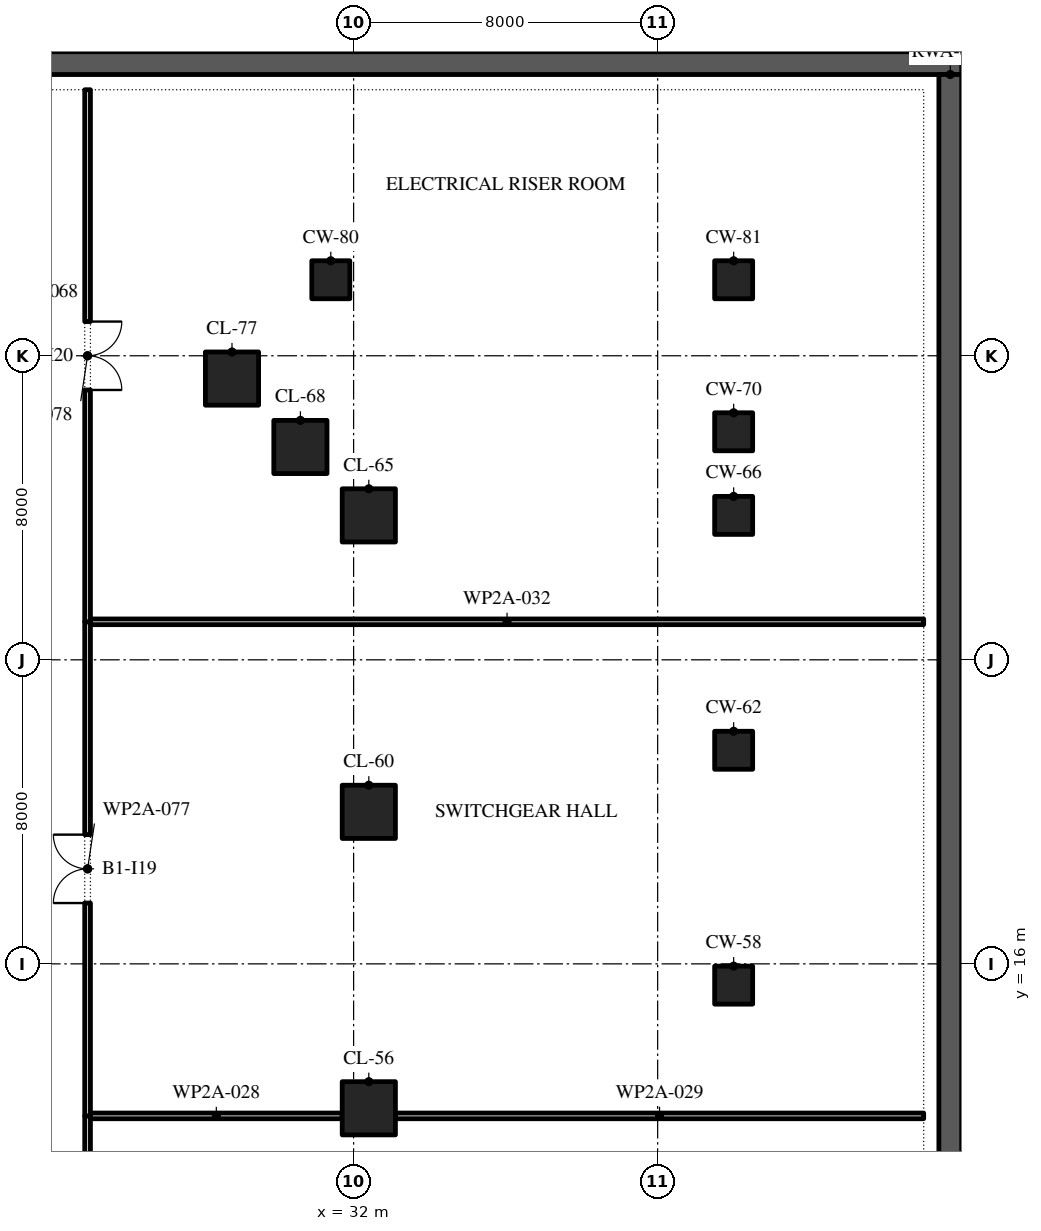
"""IFC4 building model, lengths in metres.
Left out: names, types, materials, properties, quantities, classifications, styles, units other than length and angle.
Written with IfcOpenShell. Run it as: python <this file> out.ifc"""

import sys

from ifc_helpers import new_model, si_unit, direction, frame, frame_2d, origin, origin_2d, place, context, subcontext, project, spatial, rectangle, extrude, element, fill, save


model = new_model("IFC4")
c1 = context("Model", 3, precision=1e-05, world=origin(), true_north=direction((0.0, 1.0)))
c2 = subcontext(c1, "Body", "Model", "MODEL_VIEW")
j1 = project(units=[si_unit("LENGTHUNIT", "METRE"), si_unit("PLANEANGLEUNIT", "RADIAN")], contexts=[c1])
p1 = place(None, origin())
s1 = spatial("IfcSite", under=j1, at=p1, CompositionType="ELEMENT")
p2 = place(p1, origin())
s2 = spatial("IfcBuilding", under=s1, at=p2, CompositionType="ELEMENT")
p3 = place(p2, frame((0.0, 0.0, -5.2)))
s3 = spatial("IfcBuildingStorey", under=s2, at=p3, CompositionType="ELEMENT", Elevation=-5.2)
p4 = place(p3, frame((-48.0, 39.7, 0.0), z_axis=(0.0, 0.0, 1.0), x_axis=(1.0, 0.0, 0.0)))
e1 = element("IfcWall", 1, at=p4, inside=s3, PredefinedType="SOLIDWALL", context=c2, shape_type="SweptSolid", body=[
    extrude(rectangle(XDim=96.0, YDim=0.6, at=frame_2d((48.0, 0.0))), origin(), (0.0, 0.0, 1.0), 4.8),
])
p5 = place(p3, frame((47.7, -55.4, 0.0), z_axis=(0.0, 0.0, 1.0), x_axis=(0.0, 1.0, 0.0)))
e2 = element("IfcWall", 2, at=p5, inside=s3, PredefinedType="SOLIDWALL", context=c2, shape_type="SweptSolid", body=[
    extrude(rectangle(XDim=94.8, YDim=0.6, at=frame_2d((47.4, 0.0))), origin(), (0.0, 0.0, 1.0), 4.8),
])
p6 = place(p3, frame((32.4, 12.2, 0.0), z_axis=(0.0, 0.0, 1.0), x_axis=(1.0, 0.0, 0.0)))
e3 = element("IfcColumn", 3, at=p6, inside=s3, PredefinedType="COLUMN", context=c2, shape_type="SweptSolid", body=[
    extrude(rectangle(XDim=1.4, YDim=1.4, at=origin_2d()), origin(), (0.0, 0.0, 1.0), 5.2),
])
p7 = place(p3, frame((42.0, 15.44, 0.0), z_axis=(0.0, 0.0, 1.0), x_axis=(1.0, 0.0, 0.0)))
e4 = element("IfcColumn", 4, at=p7, inside=s3, PredefinedType="COLUMN", context=c2, shape_type="SweptSolid", body=[
    extrude(rectangle(XDim=1.0, YDim=1.0, at=origin_2d()), origin(), (0.0, 0.0, 1.0), 5.2),
])
p8 = place(p3, frame((32.4, 20.0, 0.0), z_axis=(0.0, 0.0, 1.0), x_axis=(1.0, 0.0, 0.0)))
e5 = element("IfcColumn", 5, at=p8, inside=s3, PredefinedType="COLUMN", context=c2, shape_type="SweptSolid", body=[
    extrude(rectangle(XDim=1.4, YDim=1.4, at=origin_2d()), origin(), (0.0, 0.0, 1.0), 5.2),
])
p9 = place(p3, frame((42.0, 21.62, 0.0), z_axis=(0.0, 0.0, 1.0), x_axis=(1.0, 0.0, 0.0)))
e6 = element("IfcColumn", 6, at=p9, inside=s3, PredefinedType="COLUMN", context=c2, shape_type="SweptSolid", body=[
    extrude(rectangle(XDim=1.0, YDim=1.0, at=origin_2d()), origin(), (0.0, 0.0, 1.0), 5.2),
])
p10 = place(p3, frame((32.4, 27.8, 0.0), z_axis=(0.0, 0.0, 1.0), x_axis=(1.0, 0.0, 0.0)))
e7 = element("IfcColumn", 7, at=p10, inside=s3, PredefinedType="COLUMN", context=c2, shape_type="SweptSolid", body=[
    extrude(rectangle(XDim=1.4, YDim=1.4, at=origin_2d()), origin(), (0.0, 0.0, 1.0), 5.2),
])
p11 = place(p3, frame((42.0, 27.8, 0.0), z_axis=(0.0, 0.0, 1.0), x_axis=(1.0, 0.0, 0.0)))
e8 = element("IfcColumn", 8, at=p11, inside=s3, PredefinedType="COLUMN", context=c2, shape_type="SweptSolid", body=[
    extrude(rectangle(XDim=1.0, YDim=1.0, at=origin_2d()), origin(), (0.0, 0.0, 1.0), 5.2),
])
p12 = place(p3, frame((30.6, 29.6, 0.0), z_axis=(0.0, 0.0, 1.0), x_axis=(1.0, 0.0, 0.0)))
e9 = element("IfcColumn", 9, at=p12, inside=s3, PredefinedType="COLUMN", context=c2, shape_type="SweptSolid", body=[
    extrude(rectangle(XDim=1.4, YDim=1.4, at=origin_2d()), origin(), (0.0, 0.0, 1.0), 5.2),
])
p13 = place(p3, frame((42.0, 30.0, 0.0), z_axis=(0.0, 0.0, 1.0), x_axis=(1.0, 0.0, 0.0)))
e10 = element("IfcColumn", 10, at=p13, inside=s3, PredefinedType="COLUMN", context=c2, shape_type="SweptSolid", body=[
    extrude(rectangle(XDim=1.0, YDim=1.0, at=origin_2d()), origin(), (0.0, 0.0, 1.0), 5.2),
])
p14 = place(p3, frame((28.8, 31.4, 0.0), z_axis=(0.0, 0.0, 1.0), x_axis=(1.0, 0.0, 0.0)))
e11 = element("IfcColumn", 11, at=p14, inside=s3, PredefinedType="COLUMN", context=c2, shape_type="SweptSolid", body=[
    extrude(rectangle(XDim=1.4, YDim=1.4, at=origin_2d()), origin(), (0.0, 0.0, 1.0), 5.2),
])
for number, where, z_axis, x_axis in (
    (12, (31.4, 34.0, 0.0), (0.0, 0.0, 1.0), (1.0, 0.0, 0.0)),
    (13, (42.0, 34.0, 0.0), (0.0, 0.0, 1.0), (1.0, 0.0, 0.0)),
):
    element("IfcColumn", number, at=place(p3, frame(where, z_axis=z_axis, x_axis=x_axis)), inside=s3, PredefinedType="COLUMN", context=c2, shape_type="SweptSolid", body=[
        extrude(rectangle(XDim=1.0, YDim=1.0, at=origin_2d()), origin(), (0.0, 0.0, 1.0), 5.2),
    ])
p15 = place(p3, frame((25.075, 12.0, 0.0), z_axis=(0.0, 0.0, 1.0), x_axis=(1.0, 0.0, 0.0)))
e14 = element("IfcWall", 14, at=p15, inside=s3, PredefinedType="PARTITIONING", context=c2, shape_type="SweptSolid", body=[
    extrude(rectangle(XDim=6.625, YDim=0.15, at=frame_2d((3.312, 0.0))), origin(), (0.0, 0.0, 1.0), 4.9),
])
p16 = place(p3, frame((33.1, 12.0, 0.0), z_axis=(0.0, 0.0, 1.0), x_axis=(1.0, 0.0, 0.0)))
e15 = element("IfcWall", 15, at=p16, inside=s3, PredefinedType="PARTITIONING", context=c2, shape_type="SweptSolid", body=[
    extrude(rectangle(XDim=13.9, YDim=0.15, at=frame_2d((6.95, 0.0))), origin(), (0.0, 0.0, 1.0), 4.9),
])
p17 = place(p3, frame((25.075, 25.0, 0.0), z_axis=(0.0, 0.0, 1.0), x_axis=(1.0, 0.0, 0.0)))
e16 = element("IfcWall", 16, at=p17, inside=s3, PredefinedType="PARTITIONING", context=c2, shape_type="SweptSolid", body=[
    extrude(rectangle(XDim=21.925, YDim=0.15, at=frame_2d((10.962, 0.0))), origin(), (0.0, 0.0, 1.0), 4.9),
])
p18 = place(p3, frame((25.0, -2.0, 0.0), z_axis=(0.0, 0.0, 1.0), x_axis=(0.0, 1.0, 0.0)))
e17 = element("IfcWall", 17, at=p18, inside=s3, PredefinedType="PARTITIONING", context=c2, shape_type="SweptSolid", body=[
    extrude(rectangle(XDim=14.0, YDim=0.15, at=frame_2d((7.0, 0.0))), origin(), (0.0, 0.0, 1.0), 4.9),
])
p19 = place(p18, frame((2.6, 0.0, 0.0)))
e18 = element("IfcOpeningElement", 18, at=p19, cuts=e17, PredefinedType="OPENING", context=c2, shape_type="SweptSolid", body=[
    extrude(rectangle(XDim=1.8, YDim=2.1, at=frame_2d((0.9, 1.05))), frame((0.0, 0.085, 0.0), z_axis=(0.0, -1.0, 0.0), x_axis=(1.0, 0.0, 0.0)), (0.0, 0.0, 1.0), 0.17),
])
p20 = place(p18, frame((9.6, 0.0, 0.0)))
e19 = element("IfcOpeningElement", 19, at=p20, cuts=e17, PredefinedType="OPENING", context=c2, shape_type="SweptSolid", body=[
    extrude(rectangle(XDim=1.8, YDim=2.1, at=frame_2d((0.9, 1.05))), frame((0.0, 0.085, 0.0), z_axis=(0.0, -1.0, 0.0), x_axis=(1.0, 0.0, 0.0)), (0.0, 0.0, 1.0), 0.17),
])
p21 = place(p3, frame((25.0, 12.0, 0.0), z_axis=(0.0, 0.0, 1.0), x_axis=(0.0, 1.0, 0.0)))
e20 = element("IfcWall", 20, at=p21, inside=s3, PredefinedType="PARTITIONING", context=c2, shape_type="SweptSolid", body=[
    extrude(rectangle(XDim=13.0, YDim=0.15, at=frame_2d((6.5, 0.0))), origin(), (0.0, 0.0, 1.0), 4.9),
])
p22 = place(p21, frame((5.6, 0.0, 0.0)))
e21 = element("IfcOpeningElement", 21, at=p22, cuts=e20, PredefinedType="OPENING", context=c2, shape_type="SweptSolid", body=[
    extrude(rectangle(XDim=1.8, YDim=2.1, at=frame_2d((0.9, 1.05))), frame((0.0, 0.085, 0.0), z_axis=(0.0, -1.0, 0.0), x_axis=(1.0, 0.0, 0.0)), (0.0, 0.0, 1.0), 0.17),
])
p23 = place(p3, frame((25.0, 25.0, 0.0), z_axis=(0.0, 0.0, 1.0), x_axis=(0.0, 1.0, 0.0)))
e22 = element("IfcWall", 22, at=p23, inside=s3, PredefinedType="PARTITIONING", context=c2, shape_type="SweptSolid", body=[
    extrude(rectangle(XDim=14.0, YDim=0.15, at=frame_2d((7.0, 0.0))), origin(), (0.0, 0.0, 1.0), 4.9),
])
p24 = place(p23, frame((6.1, 0.0, 0.0)))
e23 = element("IfcOpeningElement", 23, at=p24, cuts=e22, PredefinedType="OPENING", context=c2, shape_type="SweptSolid", body=[
    extrude(rectangle(XDim=1.8, YDim=2.1, at=frame_2d((0.9, 1.05))), frame((0.0, 0.085, 0.0), z_axis=(0.0, -1.0, 0.0), x_axis=(1.0, 0.0, 0.0)), (0.0, 0.0, 1.0), 0.17),
])
p25 = place(p22, origin())
e24 = element("IfcDoor", 24, at=p25, inside=s3, OperationType="SINGLE_SWING_RIGHT", PredefinedType="DOOR", context=c2, shape_type="SweptSolid", body=[
    extrude(rectangle(XDim=1.8, YDim=2.1, at=frame_2d((0.9, 1.05))), frame((0.0, 0.025, 0.0), z_axis=(0.0, -1.0, 0.0), x_axis=(1.0, 0.0, 0.0)), (0.0, 0.0, 1.0), 0.05),
])
fill(e21, e24)
p26 = place(p24, frame((1.8, 0.0, 0.0), z_axis=(0.0, 0.0, 1.0), x_axis=(-1.0, 0.0, 0.0)))
e25 = element("IfcDoor", 25, at=p26, inside=s3, OperationType="SINGLE_SWING_RIGHT", PredefinedType="DOOR", context=c2, shape_type="SweptSolid", body=[
    extrude(rectangle(XDim=1.8, YDim=2.1, at=frame_2d((0.9, 1.05))), frame((0.0, 0.025, 0.0), z_axis=(0.0, -1.0, 0.0), x_axis=(1.0, 0.0, 0.0)), (0.0, 0.0, 1.0), 0.05),
])
fill(e23, e25)
save(model, sys.argv[1])
